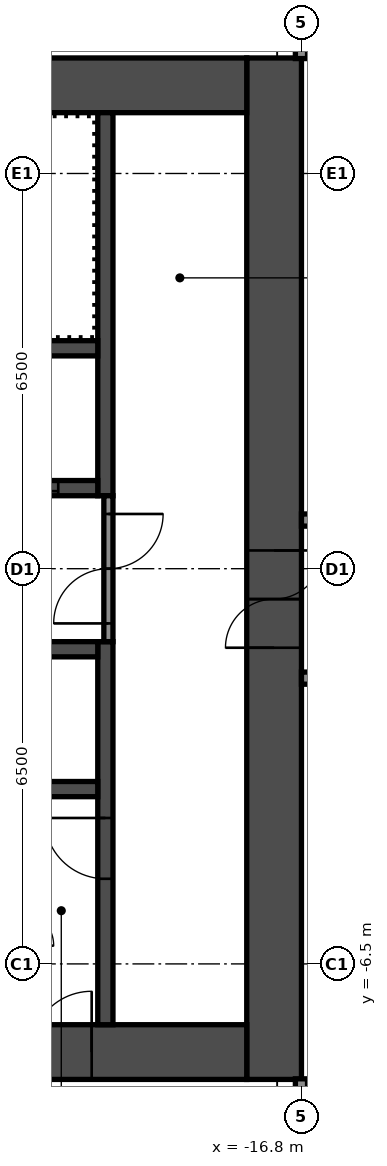
"""IFC4 building model, lengths in metres.
Left out: names, types, materials, properties, quantities, classifications, styles, units other than length and angle.
Written with IfcOpenShell. Run it as: python <this file> out.ifc"""

import sys

from ifc_helpers import new_model, si_unit, direction, frame, frame_2d, origin, place, context, subcontext, project, spatial, rectangle, extrude, element, fill, save


model = new_model("IFC4")
c1 = context("Model", 3, precision=1e-05, world=origin(), true_north=direction((0.0, 1.0)))
c2 = subcontext(c1, "Body", "Model", "MODEL_VIEW")
j1 = project(units=[si_unit("LENGTHUNIT", "METRE"), si_unit("PLANEANGLEUNIT", "RADIAN")], contexts=[c1])
p1 = place(None, origin())
s1 = spatial("IfcSite", under=j1, at=p1, CompositionType="ELEMENT")
p2 = place(p1, origin())
s2 = spatial("IfcBuilding", under=s1, at=p2, CompositionType="ELEMENT")
p3 = place(p2, frame((0.0, 0.0, 120.2)))
s3 = spatial("IfcBuildingStorey", under=s2, at=p3, CompositionType="ELEMENT", Elevation=120.2)
p4 = place(p3, frame((-17.25, -8.4, 0.0), z_axis=(0.0, 0.0, 1.0), x_axis=(0.0, 1.0, 0.0)))
e1 = element("IfcWall", 1, at=p4, inside=s3, PredefinedType="SHEAR", context=c2, shape_type="SweptSolid", body=[
    extrude(rectangle(XDim=16.8, YDim=0.9, at=frame_2d((8.4, 0.0))), origin(), (0.0, 0.0, 1.0), 4.1),
])
p5 = place(p4, frame((7.1, 0.0, 0.0)))
e2 = element("IfcOpeningElement", 2, at=p5, cuts=e1, PredefinedType="OPENING", context=c2, shape_type="SweptSolid", body=[
    extrude(rectangle(XDim=1.6, YDim=2.1, at=frame_2d((0.8, 1.05))), frame((0.0, 0.46, 0.0), z_axis=(0.0, -1.0, 0.0), x_axis=(1.0, 0.0, 0.0)), (0.0, 0.0, 1.0), 0.92),
])
p6 = place(p3, frame((-32.7, 7.95, 0.0), z_axis=(0.0, 0.0, 1.0), x_axis=(1.0, 0.0, 0.0)))
e3 = element("IfcWall", 3, at=p6, inside=s3, PredefinedType="SHEAR", context=c2, shape_type="SweptSolid", body=[
    extrude(rectangle(XDim=15.0, YDim=0.9, at=frame_2d((7.5, 0.0))), origin(), (0.0, 0.0, 1.0), 4.1),
])
p7 = place(p6, frame((3.4, 0.0, 0.0)))
e4 = element("IfcOpeningElement", 4, at=p7, cuts=e3, PredefinedType="OPENING", context=c2, shape_type="SweptSolid", body=[
    extrude(rectangle(XDim=1.2, YDim=2.1, at=frame_2d((0.6, 1.05))), frame((0.0, 0.46, 0.0), z_axis=(0.0, -1.0, 0.0), x_axis=(1.0, 0.0, 0.0)), (0.0, 0.0, 1.0), 0.92),
])
p8 = place(p6, frame((0.75, 0.0, 0.0)))
e5 = element("IfcOpeningElement", 5, at=p8, cuts=e3, PredefinedType="OPENING", context=c2, shape_type="SweptSolid", body=[
    extrude(rectangle(XDim=0.9, YDim=2.1, at=frame_2d((0.45, 1.05))), frame((0.0, 0.46, 0.0), z_axis=(0.0, -1.0, 0.0), x_axis=(1.0, 0.0, 0.0)), (0.0, 0.0, 1.0), 0.92),
])
p9 = place(p3, frame((-32.7, -7.95, 0.0), z_axis=(0.0, 0.0, 1.0), x_axis=(1.0, 0.0, 0.0)))
e6 = element("IfcWall", 6, at=p9, inside=s3, PredefinedType="SHEAR", context=c2, shape_type="SweptSolid", body=[
    extrude(rectangle(XDim=15.0, YDim=0.9, at=frame_2d((7.5, 0.0))), origin(), (0.0, 0.0, 1.0), 4.1),
])
p10 = place(p9, frame((11.45, 0.0, 0.0)))
e7 = element("IfcOpeningElement", 7, at=p10, cuts=e6, PredefinedType="OPENING", context=c2, shape_type="SweptSolid", body=[
    extrude(rectangle(XDim=1.0, YDim=2.1, at=frame_2d((0.5, 1.05))), frame((0.0, 0.46, 0.0), z_axis=(0.0, -1.0, 0.0), x_axis=(1.0, 0.0, 0.0)), (0.0, 0.0, 1.0), 0.92),
])
p11 = place(p3, frame((-20.025, 1.2, 0.0), z_axis=(0.0, 0.0, 1.0), x_axis=(0.0, 1.0, 0.0)))
e8 = element("IfcWall", 8, at=p11, inside=s3, PredefinedType="SHEAR", context=c2, shape_type="SweptSolid", body=[
    extrude(rectangle(XDim=6.3, YDim=0.25, at=frame_2d((3.15, 0.0))), origin(), (0.0, 0.0, 1.0), 4.1),
])
p12 = place(p3, frame((-20.025, -7.5, 0.0), z_axis=(0.0, 0.0, 1.0), x_axis=(0.0, 1.0, 0.0)))
e9 = element("IfcWall", 9, at=p12, inside=s3, PredefinedType="SHEAR", context=c2, shape_type="SweptSolid", body=[
    extrude(rectangle(XDim=6.3, YDim=0.25, at=frame_2d((3.15, 0.0))), origin(), (0.0, 0.0, 1.0), 4.1),
])
p13 = place(p12, frame((2.4, 0.0, 0.0)))
e10 = element("IfcOpeningElement", 10, at=p13, cuts=e9, PredefinedType="OPENING", context=c2, shape_type="SweptSolid", body=[
    extrude(rectangle(XDim=1.0, YDim=2.1, at=frame_2d((0.5, 1.05))), frame((0.0, 0.135, 0.0), z_axis=(0.0, -1.0, 0.0), x_axis=(1.0, 0.0, 0.0)), (0.0, 0.0, 1.0), 0.27),
])
p14 = place(p3, frame((-27.65, 1.325, 0.0), z_axis=(0.0, 0.0, 1.0), x_axis=(1.0, 0.0, 0.0)))
e11 = element("IfcWall", 11, at=p14, inside=s3, PredefinedType="SHEAR", context=c2, shape_type="SweptSolid", body=[
    extrude(rectangle(XDim=7.5, YDim=0.25, at=frame_2d((3.75, 0.0))), origin(), (0.0, 0.0, 1.0), 4.1),
])
p15 = place(p14, frame((5.75, 0.0, 0.0)))
e12 = element("IfcOpeningElement", 12, at=p15, cuts=e11, PredefinedType="OPENING", context=c2, shape_type="SweptSolid", body=[
    extrude(rectangle(XDim=1.1, YDim=2.1, at=frame_2d((0.55, 1.05))), frame((0.0, 0.135, 0.0), z_axis=(0.0, -1.0, 0.0), x_axis=(1.0, 0.0, 0.0)), (0.0, 0.0, 1.0), 0.27),
])
p16 = place(p14, frame((3.35, 0.0, 0.0)))
e13 = element("IfcOpeningElement", 13, at=p16, cuts=e11, PredefinedType="OPENING", context=c2, shape_type="SweptSolid", body=[
    extrude(rectangle(XDim=1.1, YDim=2.1, at=frame_2d((0.55, 1.05))), frame((0.0, 0.135, 0.0), z_axis=(0.0, -1.0, 0.0), x_axis=(1.0, 0.0, 0.0)), (0.0, 0.0, 1.0), 0.27),
])
p17 = place(p14, frame((0.95, 0.0, 0.0)))
e14 = element("IfcOpeningElement", 14, at=p17, cuts=e11, PredefinedType="OPENING", context=c2, shape_type="SweptSolid", body=[
    extrude(rectangle(XDim=1.1, YDim=2.1, at=frame_2d((0.55, 1.05))), frame((0.0, 0.135, 0.0), z_axis=(0.0, -1.0, 0.0), x_axis=(1.0, 0.0, 0.0)), (0.0, 0.0, 1.0), 0.27),
])
for number, where, z_axis, x_axis in (
    (15, (-27.65, 3.625, 0.0), (0.0, 0.0, 1.0), (1.0, 0.0, 0.0)),
    (16, (-27.65, -1.325, 0.0), (0.0, 0.0, 1.0), (1.0, 0.0, 0.0)),
    (17, (-27.65, -3.625, 0.0), (0.0, 0.0, 1.0), (1.0, 0.0, 0.0)),
):
    element("IfcWall", number, at=place(p3, frame(where, z_axis=z_axis, x_axis=x_axis)), inside=s3, PredefinedType="SHEAR", context=c2, shape_type="SweptSolid", body=[
        extrude(rectangle(XDim=7.5, YDim=0.25, at=frame_2d((3.75, 0.0))), origin(), (0.0, 0.0, 1.0), 4.1),
    ])
p18 = place(p3, frame((-19.975, -1.2, 0.0), z_axis=(0.0, 0.0, 1.0), x_axis=(0.0, 1.0, 0.0)))
e18 = element("IfcWall", 18, at=p18, inside=s3, PredefinedType="PARTITIONING", context=c2, shape_type="SweptSolid", body=[
    extrude(rectangle(XDim=2.4, YDim=0.15, at=frame_2d((1.2, 0.0))), origin(), (0.0, 0.0, 1.0), 4.1),
])
p19 = place(p18, frame((0.3, 0.0, 0.0)))
e19 = element("IfcOpeningElement", 19, at=p19, cuts=e18, PredefinedType="OPENING", context=c2, shape_type="SweptSolid", body=[
    extrude(rectangle(XDim=1.8, YDim=2.1, at=frame_2d((0.9, 1.05))), frame((0.0, 0.085, 0.0), z_axis=(0.0, -1.0, 0.0), x_axis=(1.0, 0.0, 0.0)), (0.0, 0.0, 1.0), 0.17),
])
p20 = place(p3, frame((-16.8, -1.8, 0.0), z_axis=(0.0, 0.0, 1.0), x_axis=(1.0, 0.0, 0.0)))
e20 = element("IfcWall", 20, at=p20, inside=s3, PredefinedType="PARTITIONING", context=c2, shape_type="SweptSolid", body=[
    extrude(rectangle(XDim=33.6, YDim=0.2, at=frame_2d((16.8, 0.0))), origin(), (0.0, 0.0, 1.0), 4.1),
])
p21 = place(p20, frame((3.4, 0.0, 0.0)))
e21 = element("IfcOpeningElement", 21, at=p21, cuts=e20, PredefinedType="OPENING", context=c2, shape_type="SweptSolid", body=[
    extrude(rectangle(XDim=1.6, YDim=2.1, at=frame_2d((0.8, 1.05))), frame((0.0, 0.11, 0.0), z_axis=(0.0, -1.0, 0.0), x_axis=(1.0, 0.0, 0.0)), (0.0, 0.0, 1.0), 0.22),
])
p22 = place(p20, frame((12.15, 0.0, 0.0)))
e22 = element("IfcOpeningElement", 22, at=p22, cuts=e20, PredefinedType="OPENING", context=c2, shape_type="SweptSolid", body=[
    extrude(rectangle(XDim=0.9, YDim=2.1, at=frame_2d((0.45, 1.05))), frame((0.0, 0.11, 0.0), z_axis=(0.0, -1.0, 0.0), x_axis=(1.0, 0.0, 0.0)), (0.0, 0.0, 1.0), 0.22),
])
p23 = place(p20, frame((20.55, 0.0, 0.0)))
e23 = element("IfcOpeningElement", 23, at=p23, cuts=e20, PredefinedType="OPENING", context=c2, shape_type="SweptSolid", body=[
    extrude(rectangle(XDim=0.9, YDim=2.1, at=frame_2d((0.45, 1.05))), frame((0.0, 0.11, 0.0), z_axis=(0.0, -1.0, 0.0), x_axis=(1.0, 0.0, 0.0)), (0.0, 0.0, 1.0), 0.22),
])
p24 = place(p20, frame((28.6, 0.0, 0.0)))
e24 = element("IfcOpeningElement", 24, at=p24, cuts=e20, PredefinedType="OPENING", context=c2, shape_type="SweptSolid", body=[
    extrude(rectangle(XDim=1.6, YDim=2.1, at=frame_2d((0.8, 1.05))), frame((0.0, 0.11, 0.0), z_axis=(0.0, -1.0, 0.0), x_axis=(1.0, 0.0, 0.0)), (0.0, 0.0, 1.0), 0.22),
])
p25 = place(p3, frame((-16.8, 0.8, 0.0), z_axis=(0.0, 0.0, 1.0), x_axis=(1.0, 0.0, 0.0)))
e25 = element("IfcWall", 25, at=p25, inside=s3, PredefinedType="PARTITIONING", context=c2, shape_type="SweptSolid", body=[
    extrude(rectangle(XDim=33.6, YDim=0.2, at=frame_2d((16.8, 0.0))), origin(), (0.0, 0.0, 1.0), 4.1),
])
p26 = place(p25, frame((3.75, 0.0, 0.0)))
e26 = element("IfcOpeningElement", 26, at=p26, cuts=e25, PredefinedType="OPENING", context=c2, shape_type="SweptSolid", body=[
    extrude(rectangle(XDim=0.9, YDim=2.1, at=frame_2d((0.45, 1.05))), frame((0.0, 0.11, 0.0), z_axis=(0.0, -1.0, 0.0), x_axis=(1.0, 0.0, 0.0)), (0.0, 0.0, 1.0), 0.22),
])
p27 = place(p25, frame((12.15, 0.0, 0.0)))
e27 = element("IfcOpeningElement", 27, at=p27, cuts=e25, PredefinedType="OPENING", context=c2, shape_type="SweptSolid", body=[
    extrude(rectangle(XDim=0.9, YDim=2.1, at=frame_2d((0.45, 1.05))), frame((0.0, 0.11, 0.0), z_axis=(0.0, -1.0, 0.0), x_axis=(1.0, 0.0, 0.0)), (0.0, 0.0, 1.0), 0.22),
])
p28 = place(p25, frame((20.55, 0.0, 0.0)))
e28 = element("IfcOpeningElement", 28, at=p28, cuts=e25, PredefinedType="OPENING", context=c2, shape_type="SweptSolid", body=[
    extrude(rectangle(XDim=0.9, YDim=2.1, at=frame_2d((0.45, 1.05))), frame((0.0, 0.11, 0.0), z_axis=(0.0, -1.0, 0.0), x_axis=(1.0, 0.0, 0.0)), (0.0, 0.0, 1.0), 0.22),
])
p29 = place(p25, frame((28.6, 0.0, 0.0)))
e29 = element("IfcOpeningElement", 29, at=p29, cuts=e25, PredefinedType="OPENING", context=c2, shape_type="SweptSolid", body=[
    extrude(rectangle(XDim=1.6, YDim=2.1, at=frame_2d((0.8, 1.05))), frame((0.0, 0.11, 0.0), z_axis=(0.0, -1.0, 0.0), x_axis=(1.0, 0.0, 0.0)), (0.0, 0.0, 1.0), 0.22),
])
p30 = place(p3, frame((-16.8, -19.3, 0.0), z_axis=(0.0, 0.0, 1.0), x_axis=(0.0, 1.0, 0.0)))
e30 = element("IfcWall", 30, at=p30, inside=s3, PredefinedType="PARTITIONING", context=c2, shape_type="SweptSolid", body=[
    extrude(rectangle(XDim=10.91, YDim=0.2, at=frame_2d((5.455, 0.0))), origin(), (0.0, 0.0, 1.0), 4.1),
])
p31 = place(p3, frame((-16.8, 8.39, 0.0), z_axis=(0.0, 0.0, 1.0), x_axis=(0.0, 1.0, 0.0)))
e31 = element("IfcWall", 31, at=p31, inside=s3, PredefinedType="PARTITIONING", context=c2, shape_type="SweptSolid", body=[
    extrude(rectangle(XDim=15.16, YDim=0.2, at=frame_2d((7.58, 0.0))), origin(), (0.0, 0.0, 1.0), 4.1),
])
p32 = place(p5, origin())
e32 = element("IfcDoor", 32, at=p32, inside=s3, OperationType="DOUBLE_DOOR_SINGLE_SWING", PredefinedType="DOOR", context=c2, shape_type="SweptSolid", body=[
    extrude(rectangle(XDim=1.6, YDim=2.1, at=frame_2d((0.8, 1.05))), frame((0.0, 0.025, 0.0), z_axis=(0.0, -1.0, 0.0), x_axis=(1.0, 0.0, 0.0)), (0.0, 0.0, 1.0), 0.05),
])
fill(e2, e32)
p33 = place(p10, origin())
e33 = element("IfcDoor", 33, at=p33, inside=s3, OperationType="SINGLE_SWING_LEFT", PredefinedType="DOOR", context=c2, shape_type="SweptSolid", body=[
    extrude(rectangle(XDim=1.0, YDim=2.1, at=frame_2d((0.5, 1.05))), frame((0.0, 0.025, 0.0), z_axis=(0.0, -1.0, 0.0), x_axis=(1.0, 0.0, 0.0)), (0.0, 0.0, 1.0), 0.05),
])
fill(e7, e33)
p34 = place(p13, origin())
e34 = element("IfcDoor", 34, at=p34, inside=s3, OperationType="SINGLE_SWING_LEFT", PredefinedType="DOOR", context=c2, shape_type="SweptSolid", body=[
    extrude(rectangle(XDim=1.0, YDim=2.1, at=frame_2d((0.5, 1.05))), frame((0.0, 0.025, 0.0), z_axis=(0.0, -1.0, 0.0), x_axis=(1.0, 0.0, 0.0)), (0.0, 0.0, 1.0), 0.05),
])
fill(e10, e34)
p35 = place(p19, origin())
e35 = element("IfcDoor", 35, at=p35, inside=s3, OperationType="DOUBLE_DOOR_SINGLE_SWING", PredefinedType="DOOR", context=c2, shape_type="SweptSolid", body=[
    extrude(rectangle(XDim=1.8, YDim=2.1, at=frame_2d((0.9, 1.05))), frame((0.0, 0.025, 0.0), z_axis=(0.0, -1.0, 0.0), x_axis=(1.0, 0.0, 0.0)), (0.0, 0.0, 1.0), 0.05),
])
fill(e19, e35)
p36 = place(p15, origin())
e36 = element("IfcDoor", 36, at=p36, inside=s3, OperationType="DOUBLE_DOOR_SLIDING", PredefinedType="DOOR", context=c2, shape_type="SweptSolid", body=[
    extrude(rectangle(XDim=1.1, YDim=2.1, at=frame_2d((0.55, 1.05))), frame((0.0, 0.025, 0.0), z_axis=(0.0, -1.0, 0.0), x_axis=(1.0, 0.0, 0.0)), (0.0, 0.0, 1.0), 0.05),
])
fill(e12, e36)
save(model, sys.argv[1])
